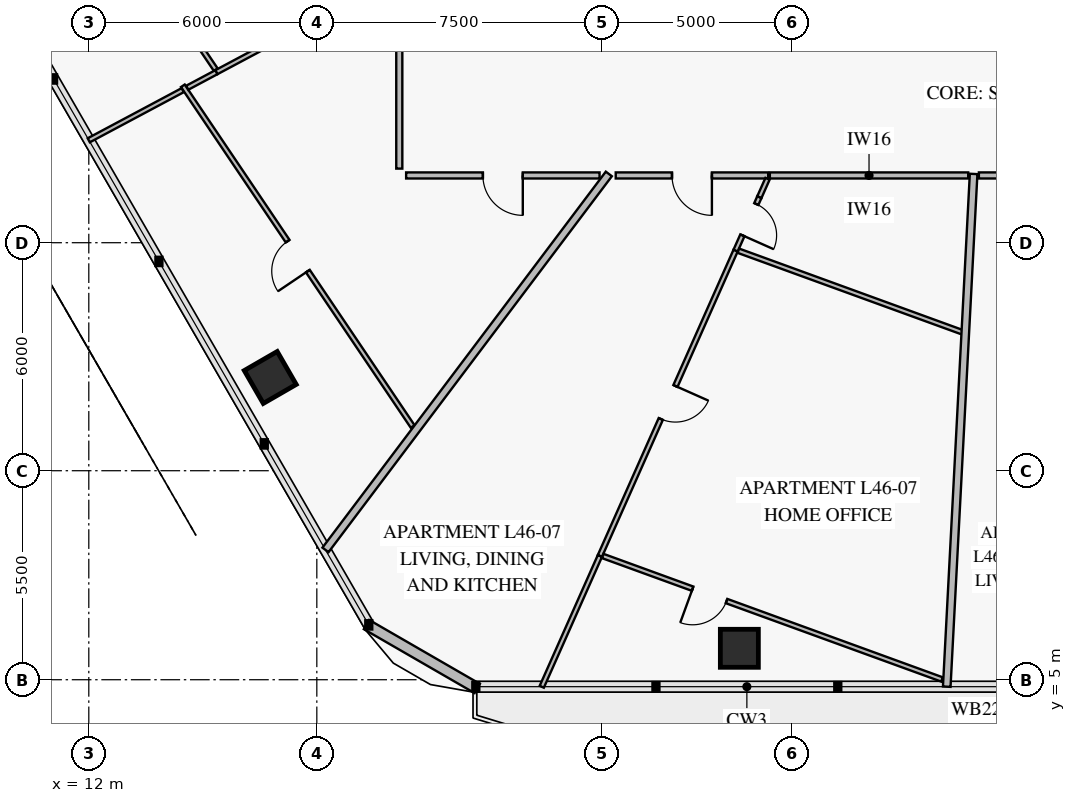
"""IFC4 building model, lengths in metres.
Left out: names, types, materials, properties, quantities, classifications, styles, units other than length and angle.
Written with IfcOpenShell. Run it as: python <this file> out.ifc"""

import sys

from ifc_helpers import new_model, si_unit, direction, frame, frame_2d, origin, origin_2d, place, context, subcontext, project, spatial, rectangle, extrude, element, fill, save


model = new_model("IFC4")
c1 = context("Model", 3, precision=1e-05, world=origin(), true_north=direction((0.0, 1.0)))
c2 = subcontext(c1, "Body", "Model", "MODEL_VIEW")
j1 = project(units=[si_unit("LENGTHUNIT", "METRE"), si_unit("PLANEANGLEUNIT", "RADIAN")], contexts=[c1])
p1 = place(None, origin())
s1 = spatial("IfcSite", under=j1, at=p1, CompositionType="ELEMENT")
p2 = place(p1, origin())
s2 = spatial("IfcBuilding", under=s1, at=p2, CompositionType="ELEMENT")
p3 = place(p2, frame((0.0, 0.0, 184.6)))
s3 = spatial("IfcBuildingStorey", under=s2, at=p3, CompositionType="ELEMENT", Elevation=184.6)
for number, where, z_axis, x_axis in (
    (1, (16.774, 12.953, 0.0), (0.0, 0.0, 1.0), (0.5, -0.866, 0.0)),
    (2, (29.118, 5.827, 0.0), (0.0, 0.0, 1.0), (1.0, 0.0, 0.0)),
):
    element("IfcColumn", number, at=place(p3, frame(where, z_axis=z_axis, x_axis=x_axis)), inside=s3, PredefinedType="COLUMN", context=c2, shape_type="SweptSolid", body=[
        extrude(rectangle(XDim=1.0, YDim=1.0, at=origin_2d()), origin(), (0.0, 0.0, 1.0), 3.55),
    ])
p4 = place(p3, frame((22.221, 4.769, 0.0), z_axis=(0.0, 0.0, 1.0), x_axis=(-0.866020068361, 0.500009241111, 0.0)))
e3 = element("IfcWall", 3, at=p4, inside=s3, PredefinedType="SOLIDWALL", context=c2, shape_type="SweptSolid", body=[
    extrude(rectangle(XDim=3.365, YDim=0.28, at=frame_2d((1.683, 0.0))), origin(), (0.0, 0.0, 1.0), 3.55),
])
p5 = place(p3, frame((14.475, 20.629, 0.0), z_axis=(0.0, 0.0, 1.0), x_axis=(0.559188221227, -0.829040730749, 0.0)))
e4 = element("IfcWall", 4, at=p5, inside=s3, PredefinedType="PARTITIONING", context=c2, shape_type="SweptSolid", body=[
    extrude(rectangle(XDim=10.814, YDim=0.12, at=frame_2d((5.407, 0.0))), origin(), (0.0, 0.0, 1.0), 2.9),
])
p6 = place(p5, frame((4.932, 0.0, 0.0)))
e5 = element("IfcOpeningElement", 5, at=p6, cuts=e4, PredefinedType="OPENING", context=c2, shape_type="SweptSolid", body=[
    extrude(rectangle(XDim=0.95, YDim=2.1, at=frame_2d((0.475, 1.05))), frame((0.0, 0.072, 0.0), z_axis=(0.0, -1.0, 0.0), x_axis=(1.0, 0.0, 0.0)), (0.0, 0.0, 1.0), 0.144),
])
p7 = place(p3, frame((19.09, 22.979, 0.0), z_axis=(0.0, 0.0, 1.0), x_axis=(-0.882290665846, -0.470704982936, 0.0)))
e6 = element("IfcWall", 6, at=p7, inside=s3, PredefinedType="PARTITIONING", context=c2, shape_type="SweptSolid", body=[
    extrude(rectangle(XDim=4.233, YDim=0.12, at=frame_2d((2.116, 0.0))), origin(), (0.0, 0.0, 1.0), 3.15),
])
p8 = place(p7, frame((1.616, 0.0, 0.0)))
e7 = element("IfcOpeningElement", 7, at=p8, cuts=e6, PredefinedType="OPENING", context=c2, shape_type="SweptSolid", body=[
    extrude(rectangle(XDim=0.95, YDim=2.1, at=frame_2d((0.475, 1.05))), frame((0.0, 0.072, 0.0), z_axis=(0.0, -1.0, 0.0), x_axis=(1.0, 0.0, 0.0)), (0.0, 0.0, 1.0), 0.144),
])
p9 = place(p3, frame((12.317, 25.536, 0.0), z_axis=(0.0, 0.0, 1.0), x_axis=(0.559205201825, -0.829029277078, 0.0)))
e8 = element("IfcWall", 8, at=p9, inside=s3, PredefinedType="PARTITIONING", context=c2, shape_type="SweptSolid", body=[
    extrude(rectangle(XDim=5.405, YDim=0.12, at=frame_2d((2.703, 0.0))), origin(), (0.0, 0.0, 1.0), 2.9),
])
p10 = place(p9, frame((2.312, 0.0, 0.0)))
e9 = element("IfcOpeningElement", 9, at=p10, cuts=e8, PredefinedType="OPENING", context=c2, shape_type="SweptSolid", body=[
    extrude(rectangle(XDim=0.95, YDim=2.1, at=frame_2d((0.475, 1.05))), frame((0.0, 0.072, 0.0), z_axis=(0.0, -1.0, 0.0), x_axis=(1.0, 0.0, 0.0)), (0.0, 0.0, 1.0), 0.144),
])
p11 = place(p3, frame((20.35, 18.27, 0.0), z_axis=(0.0, 0.0, 1.0), x_axis=(1.0, 0.0, 0.0)))
e10 = element("IfcWall", 10, at=p11, inside=s3, PredefinedType="PARTITIONING", context=c2, shape_type="SweptSolid", body=[
    extrude(rectangle(XDim=5.089, YDim=0.16, at=frame_2d((2.545, 0.0))), origin(), (0.0, 0.0, 1.0), 2.9),
])
p12 = place(p11, frame((2.02, 0.0, 0.0)))
e11 = element("IfcOpeningElement", 11, at=p12, cuts=e10, PredefinedType="OPENING", context=c2, shape_type="SweptSolid", body=[
    extrude(rectangle(XDim=1.05, YDim=2.15, at=frame_2d((0.525, 1.075))), frame((0.0, 0.092, 0.0), z_axis=(0.0, -1.0, 0.0), x_axis=(1.0, 0.0, 0.0)), (0.0, 0.0, 1.0), 0.184),
])
p13 = place(p3, frame((29.645, 17.7, 0.0), z_axis=(0.0, 0.0, 1.0), x_axis=(-0.406138466053, -0.91381154862, 0.0)))
e12 = element("IfcWall", 12, at=p13, inside=s3, PredefinedType="PARTITIONING", context=c2, shape_type="SweptSolid", body=[
    extrude(rectangle(XDim=1.544, YDim=0.12, at=frame_2d((0.772, 0.0))), origin(), (0.0, 0.0, 1.0), 3.55),
])
p14 = place(p13, frame((0.2, 0.0, 0.0)))
e13 = element("IfcOpeningElement", 13, at=p14, cuts=e12, PredefinedType="OPENING", context=c2, shape_type="SweptSolid", body=[
    extrude(rectangle(XDim=0.9, YDim=2.1, at=frame_2d((0.45, 1.05))), frame((0.0, 0.072, 0.0), z_axis=(0.0, -1.0, 0.0), x_axis=(1.0, 0.0, 0.0)), (0.0, 0.0, 1.0), 0.144),
])
p15 = place(p3, frame((29.018, 16.289, 0.0), z_axis=(0.0, 0.0, 1.0), x_axis=(-0.406112696121, -0.913823001489, 0.0)))
e14 = element("IfcWall", 14, at=p15, inside=s3, PredefinedType="PARTITIONING", context=c2, shape_type="SweptSolid", body=[
    extrude(rectangle(XDim=8.79, YDim=0.12, at=frame_2d((4.395, 0.0))), origin(), (0.0, 0.0, 1.0), 3.55),
])
p16 = place(p15, frame((3.895, 0.0, 0.0)))
e15 = element("IfcOpeningElement", 15, at=p16, cuts=e14, PredefinedType="OPENING", context=c2, shape_type="SweptSolid", body=[
    extrude(rectangle(XDim=0.95, YDim=2.1, at=frame_2d((0.475, 1.05))), frame((0.0, 0.072, 0.0), z_axis=(0.0, -1.0, 0.0), x_axis=(1.0, 0.0, 0.0)), (0.0, 0.0, 1.0), 0.144),
])
p17 = place(p3, frame((25.523, 8.256, 0.0), z_axis=(0.0, 0.0, 1.0), x_axis=(0.939699589425, -0.34200099654, 0.0)))
e16 = element("IfcWall", 16, at=p17, inside=s3, PredefinedType="PARTITIONING", context=c2, shape_type="SweptSolid", body=[
    extrude(rectangle(XDim=9.499, YDim=0.12, at=frame_2d((4.75, 0.0))), origin(), (0.0, 0.0, 1.0), 2.87),
])
p18 = place(p17, frame((2.517, 0.0, 0.0)))
e17 = element("IfcOpeningElement", 17, at=p18, cuts=e16, PredefinedType="OPENING", context=c2, shape_type="SweptSolid", body=[
    extrude(rectangle(XDim=0.95, YDim=2.1, at=frame_2d((0.475, 1.05))), frame((0.0, 0.072, 0.0), z_axis=(0.0, -1.0, 0.0), x_axis=(1.0, 0.0, 0.0)), (0.0, 0.0, 1.0), 0.144),
])
p19 = place(p3, frame((25.865, 18.27, 0.0), z_axis=(0.0, 0.0, 1.0), x_axis=(1.0, 0.0, 0.0)))
e18 = element("IfcWall", 18, at=p19, inside=s3, PredefinedType="PARTITIONING", context=c2, shape_type="SweptSolid", body=[
    extrude(rectangle(XDim=4.011, YDim=0.16, at=frame_2d((2.006, 0.0))), origin(), (0.0, 0.0, 1.0), 3.55),
])
p20 = place(p19, frame((1.481, 0.0, 0.0)))
e19 = element("IfcOpeningElement", 19, at=p20, cuts=e18, PredefinedType="OPENING", context=c2, shape_type="SweptSolid", body=[
    extrude(rectangle(XDim=1.05, YDim=2.15, at=frame_2d((0.525, 1.075))), frame((0.0, 0.092, 0.0), z_axis=(0.0, -1.0, 0.0), x_axis=(1.0, 0.0, 0.0)), (0.0, 0.0, 1.0), 0.184),
])
p21 = place(p3, frame((35.421, 18.27, 0.0), z_axis=(0.0, 0.0, 1.0), x_axis=(1.0, 0.0, 0.0)))
e20 = element("IfcWall", 20, at=p21, inside=s3, PredefinedType="PARTITIONING", context=c2, shape_type="SweptSolid", body=[
    extrude(rectangle(XDim=2.616, YDim=0.16, at=frame_2d((1.308, 0.0))), origin(), (0.0, 0.0, 1.0), 3.55),
])
p22 = place(p21, frame((0.783, 0.0, 0.0)))
e21 = element("IfcOpeningElement", 21, at=p22, cuts=e20, PredefinedType="OPENING", context=c2, shape_type="SweptSolid", body=[
    extrude(rectangle(XDim=1.05, YDim=2.15, at=frame_2d((0.525, 1.075))), frame((0.0, 0.092, 0.0), z_axis=(0.0, -1.0, 0.0), x_axis=(1.0, 0.0, 0.0)), (0.0, 0.0, 1.0), 0.184),
])
p23 = place(p3, frame((15.356, 20.986, 0.0), z_axis=(0.0, 0.0, 1.0), x_axis=(-0.882282750181, -0.47071981978, 0.0)))
e22 = element("IfcWall", 22, at=p23, inside=s3, PredefinedType="PARTITIONING", context=c2, shape_type="SweptSolid", body=[
    extrude(rectangle(XDim=0.867, YDim=0.12, at=frame_2d((0.433, 0.0))), origin(), (0.0, 0.0, 1.0), 3.55),
])
p24 = place(p3, frame((14.47, 20.514, 0.0), z_axis=(0.0, 0.0, 1.0), x_axis=(-0.882297449113, -0.470692268141, 0.0)))
e23 = element("IfcWall", 23, at=p24, inside=s3, PredefinedType="PARTITIONING", context=c2, shape_type="SweptSolid", body=[
    extrude(rectangle(XDim=2.802, YDim=0.12, at=frame_2d((1.401, 0.0))), origin(), (0.0, 0.0, 1.0), 2.87),
])
p25 = place(p3, frame((25.684, 18.31, 0.0), z_axis=(0.0, 0.0, 1.0), x_axis=(-0.601811441108, -0.798638209299, 0.0)))
e24 = element("IfcWall", 24, at=p25, inside=s3, PredefinedType="PARTITIONING", context=c2, shape_type="SweptSolid", body=[
    extrude(rectangle(XDim=12.389, YDim=0.2, at=frame_2d((6.194, 0.0))), origin(), (0.0, 0.0, 1.0), 2.87),
])
p26 = place(p3, frame((29.859, 18.182, 0.0), z_axis=(0.0, 0.0, 1.0), x_axis=(-0.406009598867, -0.913868812045, 0.0)))
e25 = element("IfcWall", 25, at=p26, inside=s3, PredefinedType="PARTITIONING", context=c2, shape_type="SweptSolid", body=[
    extrude(rectangle(XDim=0.527, YDim=0.12, at=frame_2d((0.264, 0.0))), origin(), (0.0, 0.0, 1.0), 3.55),
])
p27 = place(p3, frame((25.449, 8.257, 0.0), z_axis=(0.0, 0.0, 1.0), x_axis=(-0.406156505526, -0.913803530864, 0.0)))
e26 = element("IfcWall", 26, at=p27, inside=s3, PredefinedType="PARTITIONING", context=c2, shape_type="SweptSolid", body=[
    extrude(rectangle(XDim=3.767, YDim=0.12, at=frame_2d((1.884, 0.0))), origin(), (0.0, 0.0, 1.0), 2.87),
])
p28 = place(p3, frame((29.093, 16.289, 0.0), z_axis=(0.0, 0.0, 1.0), x_axis=(0.939683531228, -0.342045115647, 0.0)))
e27 = element("IfcWall", 27, at=p28, inside=s3, PredefinedType="PARTITIONING", context=c2, shape_type="SweptSolid", body=[
    extrude(rectangle(XDim=6.295, YDim=0.12, at=frame_2d((3.147, 0.0))), origin(), (0.0, 0.0, 1.0), 2.9),
])
p29 = place(p3, frame((35.282, 18.31, 0.0), z_axis=(0.0, 0.0, 1.0), x_axis=(-0.052327430458, -0.998629981536, 0.0)))
e28 = element("IfcWall", 28, at=p29, inside=s3, PredefinedType="PARTITIONING", context=c2, shape_type="SweptSolid", body=[
    extrude(rectangle(XDim=13.512, YDim=0.2, at=frame_2d((6.756, 0.0))), origin(), (0.0, 0.0, 1.0), 2.87),
])
p30 = place(p3, frame((20.17, 22.15, 0.0), z_axis=(0.0, 0.0, 1.0), x_axis=(0.0, -1.0, 0.0)))
e29 = element("IfcWall", 29, at=p30, inside=s3, PredefinedType="PARTITIONING", context=c2, shape_type="SweptSolid", body=[
    extrude(rectangle(XDim=3.7, YDim=0.16, at=frame_2d((1.85, 0.0))), origin(), (0.0, 0.0, 1.0), 3.15),
])
p31 = place(p3, frame((29.92, 18.27, 0.0), z_axis=(0.0, 0.0, 1.0), x_axis=(1.0, 0.0, 0.0)))
e30 = element("IfcWall", 30, at=p31, inside=s3, PredefinedType="PARTITIONING", context=c2, shape_type="SweptSolid", body=[
    extrude(rectangle(XDim=5.22, YDim=0.16, at=frame_2d((2.61, 0.0))), origin(), (0.0, 0.0, 1.0), 2.9),
])
p32 = place(p6, frame((0.95, 0.0, 0.0), z_axis=(0.0, 0.0, 1.0), x_axis=(-1.0, 0.0, 0.0)))
e31 = element("IfcDoor", 31, at=p32, inside=s3, OperationType="SINGLE_SWING_LEFT", PredefinedType="DOOR", context=c2, shape_type="SweptSolid", body=[
    extrude(rectangle(XDim=0.95, YDim=2.1, at=frame_2d((0.475, 1.05))), frame((0.0, 0.025, 0.0), z_axis=(0.0, -1.0, 0.0), x_axis=(1.0, 0.0, 0.0)), (0.0, 0.0, 1.0), 0.05),
])
fill(e5, e31)
p33 = place(p12, frame((1.05, 0.0, 0.0), z_axis=(0.0, 0.0, 1.0), x_axis=(-1.0, 0.0, 0.0)))
e32 = element("IfcDoor", 32, at=p33, inside=s3, OperationType="SINGLE_SWING_LEFT", PredefinedType="DOOR", context=c2, shape_type="SweptSolid", body=[
    extrude(rectangle(XDim=1.05, YDim=2.15, at=frame_2d((0.525, 1.075))), frame((0.0, 0.025, 0.0), z_axis=(0.0, -1.0, 0.0), x_axis=(1.0, 0.0, 0.0)), (0.0, 0.0, 1.0), 0.05),
])
fill(e11, e32)
p34 = place(p14, origin())
e33 = element("IfcDoor", 33, at=p34, inside=s3, OperationType="SINGLE_SWING_RIGHT", PredefinedType="DOOR", context=c2, shape_type="SweptSolid", body=[
    extrude(rectangle(XDim=0.9, YDim=2.1, at=frame_2d((0.45, 1.05))), frame((0.0, 0.025, 0.0), z_axis=(0.0, -1.0, 0.0), x_axis=(1.0, 0.0, 0.0)), (0.0, 0.0, 1.0), 0.05),
])
fill(e13, e33)
p35 = place(p16, origin())
e34 = element("IfcDoor", 34, at=p35, inside=s3, OperationType="SINGLE_SWING_LEFT", PredefinedType="DOOR", context=c2, shape_type="SweptSolid", body=[
    extrude(rectangle(XDim=0.95, YDim=2.1, at=frame_2d((0.475, 1.05))), frame((0.0, 0.025, 0.0), z_axis=(0.0, -1.0, 0.0), x_axis=(1.0, 0.0, 0.0)), (0.0, 0.0, 1.0), 0.05),
])
fill(e15, e34)
p36 = place(p18, frame((0.95, 0.0, 0.0), z_axis=(0.0, 0.0, 1.0), x_axis=(-1.0, 0.0, 0.0)))
e35 = element("IfcDoor", 35, at=p36, inside=s3, OperationType="SINGLE_SWING_RIGHT", PredefinedType="DOOR", context=c2, shape_type="SweptSolid", body=[
    extrude(rectangle(XDim=0.95, YDim=2.1, at=frame_2d((0.475, 1.05))), frame((0.0, 0.025, 0.0), z_axis=(0.0, -1.0, 0.0), x_axis=(1.0, 0.0, 0.0)), (0.0, 0.0, 1.0), 0.05),
])
fill(e17, e35)
p37 = place(p20, frame((1.05, 0.0, 0.0), z_axis=(0.0, 0.0, 1.0), x_axis=(-1.0, 0.0, 0.0)))
e36 = element("IfcDoor", 36, at=p37, inside=s3, OperationType="SINGLE_SWING_LEFT", PredefinedType="DOOR", context=c2, shape_type="SweptSolid", body=[
    extrude(rectangle(XDim=1.05, YDim=2.15, at=frame_2d((0.525, 1.075))), frame((0.0, 0.025, 0.0), z_axis=(0.0, -1.0, 0.0), x_axis=(1.0, 0.0, 0.0)), (0.0, 0.0, 1.0), 0.05),
])
fill(e19, e36)
save(model, sys.argv[1])
